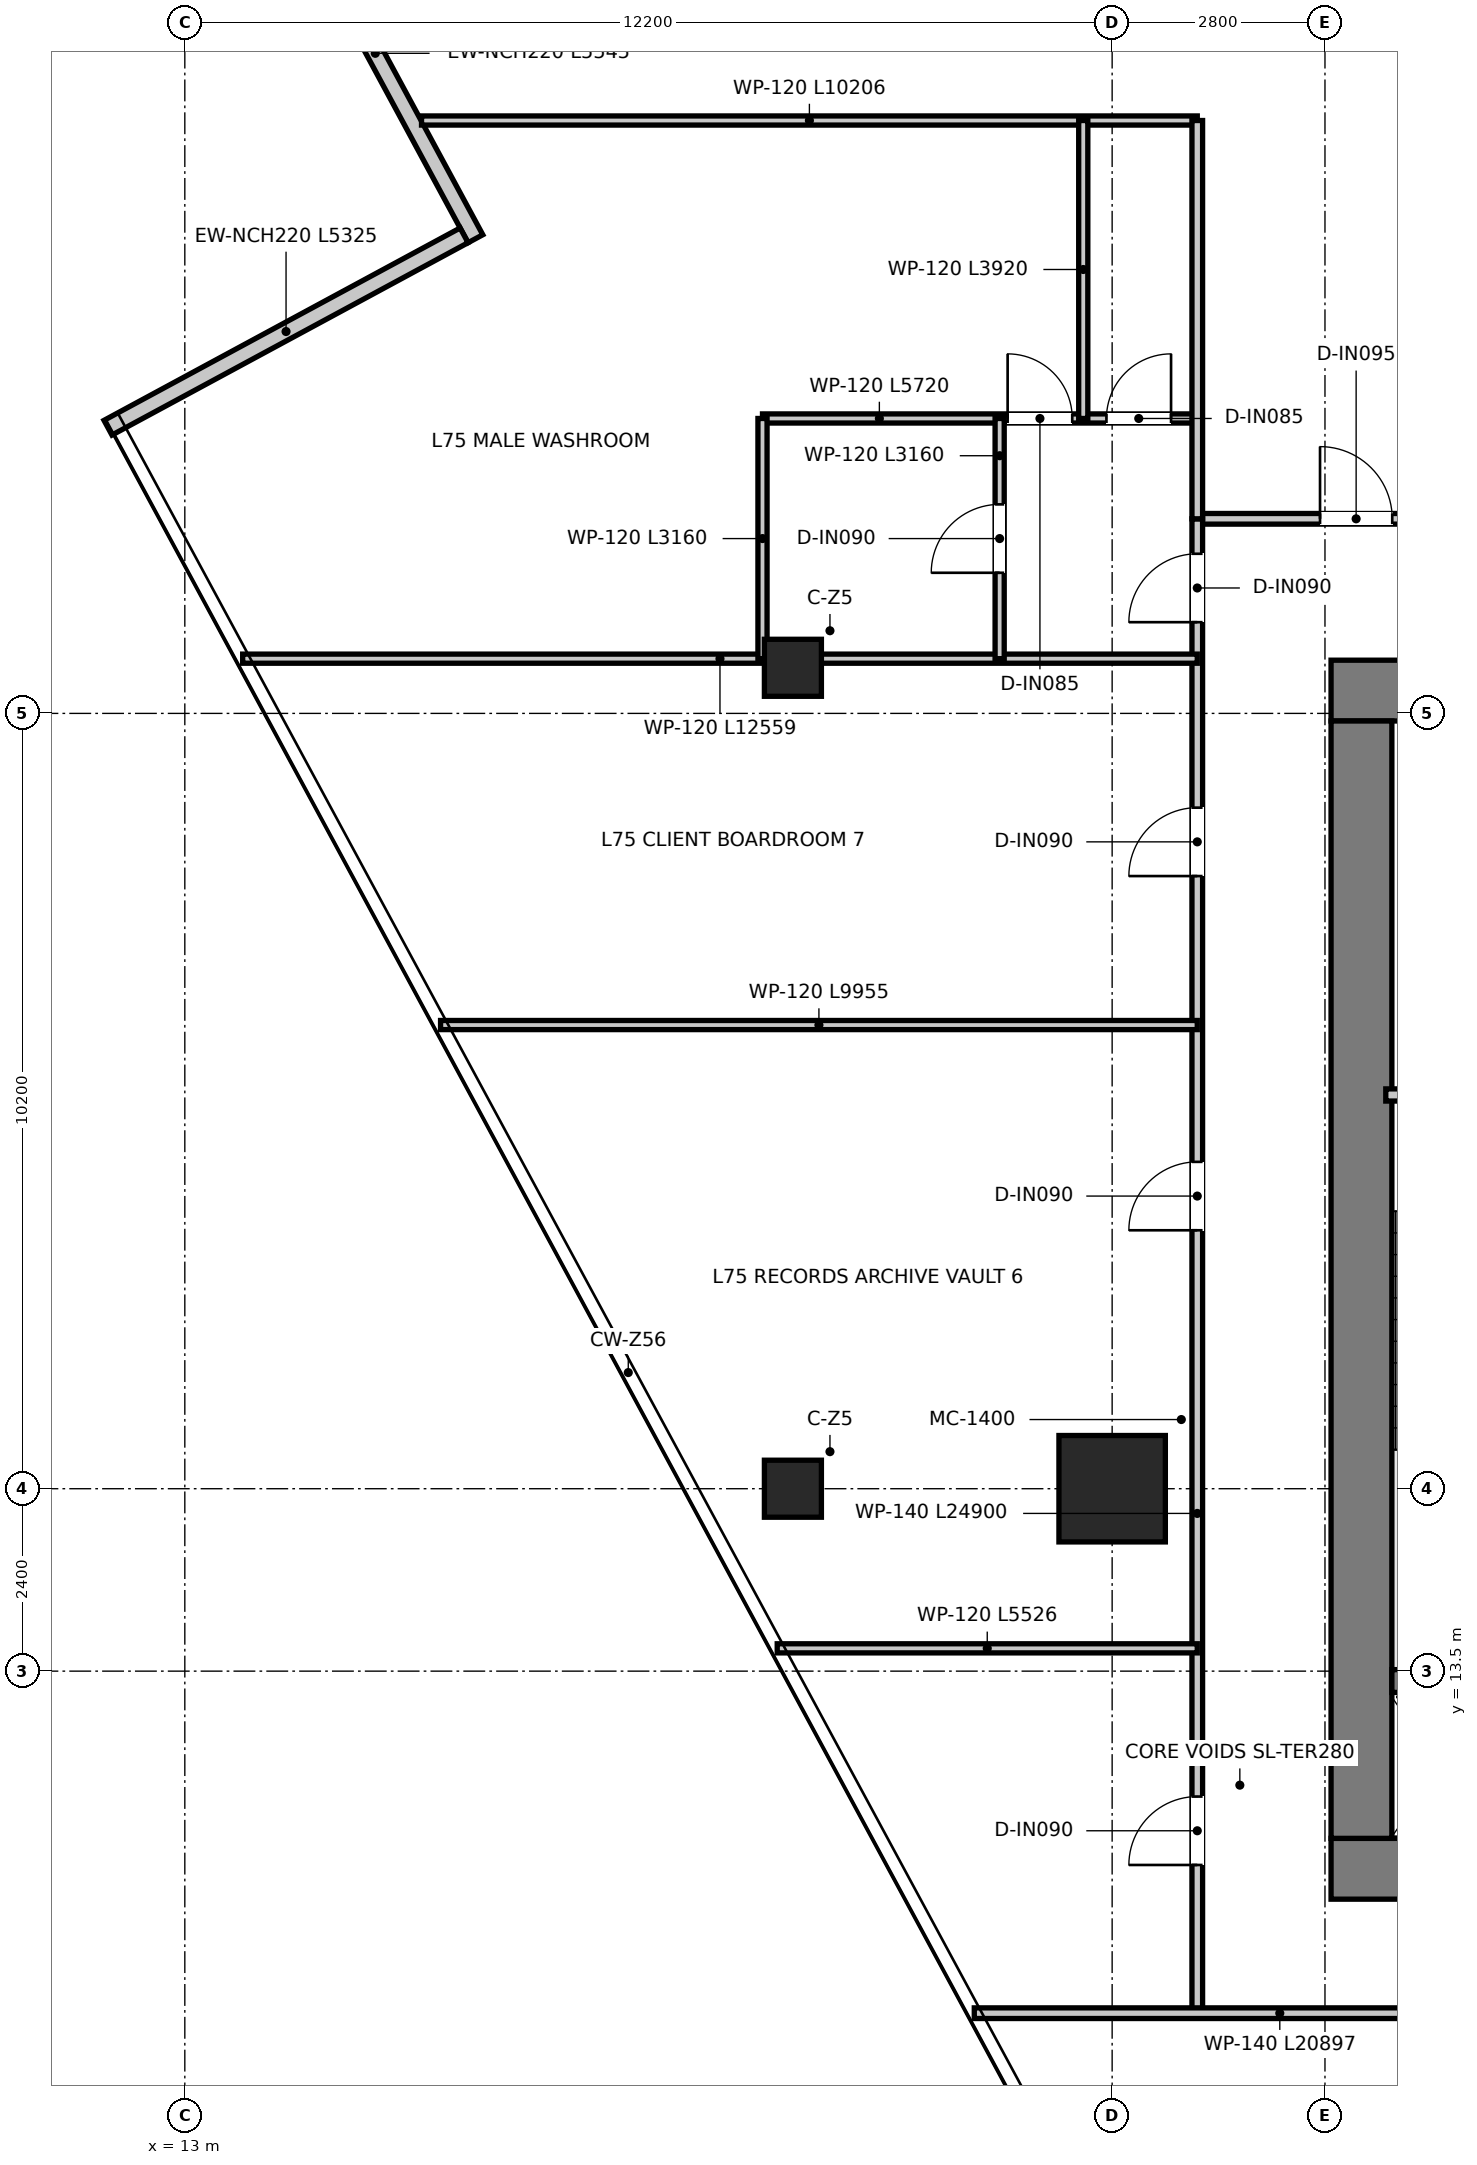
"""IFC4 building model, lengths in metres.
Left out: names, types, materials, properties, quantities, classifications, styles, units other than length and angle.
Written with IfcOpenShell. Run it as: python <this file> out.ifc"""

import sys

from ifc_helpers import new_model, si_unit, direction, frame, frame_2d, origin, origin_2d, place, context, subcontext, project, spatial, rectangle, extrude, source, transform, mapped, element, fill, save


model = new_model("IFC4")
c1 = context("Model", 3, precision=1e-05, world=origin(), true_north=direction((0.0, 1.0)))
c2 = subcontext(c1, "Body", "Model", "MODEL_VIEW")
j1 = project(units=[si_unit("LENGTHUNIT", "METRE"), si_unit("PLANEANGLEUNIT", "RADIAN")], contexts=[c1])
p1 = place(None, origin())
s1 = spatial("IfcSite", under=j1, at=p1, CompositionType="ELEMENT")
p2 = place(p1, origin())
s2 = spatial("IfcBuilding", under=s1, at=p2, CompositionType="ELEMENT")
p3 = place(p2, frame((0.0, 0.0, 306.9)))
s3 = spatial("IfcBuildingStorey", under=s2, at=p3, CompositionType="ELEMENT", Elevation=306.9)
p4 = place(p3, frame((28.08, 10.9, 0.0), z_axis=(0.0, 0.0, 1.0), x_axis=(1.0, 0.0, 0.0)))
e1 = element("IfcWall", 1, at=p4, inside=s3, PredefinedType="SHEAR", context=c2, shape_type="SweptSolid", body=[
    extrude(rectangle(XDim=15.84, YDim=0.8, at=frame_2d((7.92, 0.0))), origin(), (0.0, 0.0, 1.0), 3.95),
])
p5 = place(p3, frame((28.08, 26.4, 0.0), z_axis=(0.0, 0.0, 1.0), x_axis=(1.0, 0.0, 0.0)))
e2 = element("IfcWall", 2, at=p5, inside=s3, PredefinedType="SHEAR", context=c2, shape_type="SweptSolid", body=[
    extrude(rectangle(XDim=15.84, YDim=0.8, at=frame_2d((7.92, 0.0))), origin(), (0.0, 0.0, 1.0), 3.95),
])
p6 = place(p5, frame((7.22, 0.0, 0.0)))
e3 = element("IfcOpeningElement", 3, at=p6, cuts=e2, PredefinedType="OPENING", context=c2, shape_type="SweptSolid", body=[
    extrude(rectangle(XDim=1.4, YDim=2.2, at=frame_2d((0.7, 1.1))), frame((0.0, 0.41, 0.0), z_axis=(0.0, -1.0, 0.0), x_axis=(1.0, 0.0, 0.0)), (0.0, 0.0, 1.0), 0.82),
])
p7 = place(p5, frame((1.775, 0.0, 0.0)))
e4 = element("IfcOpeningElement", 4, at=p7, cuts=e2, PredefinedType="OPENING", context=c2, shape_type="SweptSolid", body=[
    extrude(rectangle(XDim=1.05, YDim=2.1, at=frame_2d((0.525, 1.05))), frame((0.0, 0.41, 0.0), z_axis=(0.0, -1.0, 0.0), x_axis=(1.0, 0.0, 0.0)), (0.0, 0.0, 1.0), 0.82),
])
p8 = place(p5, frame((13.015, 0.0, 0.0)))
e5 = element("IfcOpeningElement", 5, at=p8, cuts=e2, PredefinedType="OPENING", context=c2, shape_type="SweptSolid", body=[
    extrude(rectangle(XDim=1.05, YDim=2.1, at=frame_2d((0.525, 1.05))), frame((0.0, 0.41, 0.0), z_axis=(0.0, -1.0, 0.0), x_axis=(1.0, 0.0, 0.0)), (0.0, 0.0, 1.0), 0.82),
])
p9 = place(p3, frame((28.48, 11.3, 0.0), z_axis=(0.0, 0.0, 1.0), x_axis=(0.0, 1.0, 0.0)))
e6 = element("IfcWall", 6, at=p9, inside=s3, PredefinedType="SHEAR", context=c2, shape_type="SweptSolid", body=[
    extrude(rectangle(XDim=14.7, YDim=0.8, at=frame_2d((7.35, 0.0))), origin(), (0.0, 0.0, 1.0), 3.95),
])
p10 = place(p3, frame((28.88, 13.37, 0.0), z_axis=(0.0, 0.0, 1.0), x_axis=(1.0, 0.0, 0.0)))
e7 = element("IfcWall", 7, at=p10, inside=s3, PredefinedType="SHEAR", context=c2, shape_type="SweptSolid", body=[
    extrude(rectangle(XDim=3.1, YDim=0.3, at=frame_2d((1.55, 0.0))), origin(), (0.0, 0.0, 1.0), 3.95),
])
m1 = source(origin(), c2, "Body", "SweptSolid", [
    extrude(rectangle(XDim=1.4, YDim=1.4, at=origin_2d()), origin(), (0.0, 0.0, 1.0), 3.95),
])
p11 = place(p3, frame((25.2, 15.9, 0.0), z_axis=(0.0, 0.0, 1.0), x_axis=(1.0, 0.0, 0.0)))
e8 = element("IfcColumn", 8, at=p11, inside=s3, PredefinedType="USERDEFINED", context=c2, shape_type="MappedRepresentation", body=[
    mapped(m1, transform((0.0, 0.0, 0.0), x_axis=(1.0, 0.0, 0.0), y_axis=(0.0, 1.0, 0.0), z_axis=(0.0, 0.0, 1.0), scale=1.0)),
])
m2 = source(origin(), c2, "Body", "SweptSolid", [
    extrude(rectangle(XDim=0.75, YDim=0.75, at=origin_2d()), origin(), (0.0, 0.0, 1.0), 3.95),
])
for number, where, z_axis, x_axis in (
    (9, (21.0, 15.9, 0.0), (0.0, 0.0, 1.0), (1.0, 0.0, 0.0)),
    (10, (21.0, 26.7, 0.0), (0.0, 0.0, 1.0), (1.0, 0.0, 0.0)),
):
    element("IfcColumn", number, at=place(p3, frame(where, z_axis=z_axis, x_axis=x_axis)), inside=s3, PredefinedType="COLUMN", context=c2, shape_type="MappedRepresentation", body=[
        mapped(m2, transform((0.0, 0.0, 0.0), x_axis=(1.0, 0.0, 0.0), y_axis=(0.0, 1.0, 0.0), z_axis=(0.0, 0.0, 1.0), scale=1.0)),
    ])
p12 = place(p3, frame((14.188, 37.223, 0.0), z_axis=(0.0, 0.0, 1.0), x_axis=(0.475257315172, -0.879846852796, 0.0)))
e11 = element("IfcWall", 11, at=p12, inside=s3, PredefinedType="ELEMENTEDWALL", context=c2, shape_type="SweptSolid", body=[
    extrude(rectangle(XDim=5.545, YDim=0.22, at=frame_2d((2.772, 0.0))), origin(), (0.0, 0.0, 1.0), 3.67),
])
p13 = place(p3, frame((16.674, 32.389, 0.0), z_axis=(0.0, 0.0, 1.0), x_axis=(-0.879859387449, -0.475234108958, 0.0)))
e12 = element("IfcWall", 12, at=p13, inside=s3, PredefinedType="ELEMENTEDWALL", context=c2, shape_type="SweptSolid", body=[
    extrude(rectangle(XDim=5.325, YDim=0.22, at=frame_2d((2.662, 0.0))), origin(), (0.0, 0.0, 1.0), 3.67),
])
p14 = place(p3, frame((28.8, 21.08, 0.0), z_axis=(0.0, 0.0, 1.0), x_axis=(1.0, 0.0, 0.0)))
e13 = element("IfcWall", 13, at=p14, inside=s3, PredefinedType="PARTITIONING", context=c2, shape_type="SweptSolid", body=[
    extrude(rectangle(XDim=3.16, YDim=0.16, at=frame_2d((1.58, 0.0))), origin(), (0.0, 0.0, 1.0), 3.67),
])
p15 = place(p14, frame((1.055, 0.0, 0.0)))
e14 = element("IfcOpeningElement", 14, at=p15, cuts=e13, PredefinedType="OPENING", context=c2, shape_type="SweptSolid", body=[
    extrude(rectangle(XDim=1.05, YDim=2.1, at=frame_2d((0.525, 1.05))), frame((0.0, 0.09, 0.0), z_axis=(0.0, -1.0, 0.0), x_axis=(1.0, 0.0, 0.0)), (0.0, 0.0, 1.0), 0.18),
])
p16 = place(p3, frame((26.32, 28.66, 0.0), z_axis=(0.0, 0.0, 1.0), x_axis=(1.0, 0.0, 0.0)))
e15 = element("IfcWall", 15, at=p16, inside=s3, PredefinedType="PARTITIONING", context=c2, shape_type="SweptSolid", body=[
    extrude(rectangle(XDim=19.36, YDim=0.14, at=frame_2d((9.68, 0.0))), origin(), (0.0, 0.0, 1.0), 3.18),
])
p17 = place(p16, frame((1.615, 0.0, 0.0)))
e16 = element("IfcOpeningElement", 16, at=p17, cuts=e15, PredefinedType="OPENING", context=c2, shape_type="SweptSolid", body=[
    extrude(rectangle(XDim=0.95, YDim=2.1, at=frame_2d((0.475, 1.05))), frame((0.0, 0.08, 0.0), z_axis=(0.0, -1.0, 0.0), x_axis=(1.0, 0.0, 0.0)), (0.0, 0.0, 1.0), 0.16),
])
p18 = place(p16, frame((6.455, 0.0, 0.0)))
e17 = element("IfcOpeningElement", 17, at=p18, cuts=e15, PredefinedType="OPENING", context=c2, shape_type="SweptSolid", body=[
    extrude(rectangle(XDim=0.95, YDim=2.1, at=frame_2d((0.475, 1.05))), frame((0.0, 0.08, 0.0), z_axis=(0.0, -1.0, 0.0), x_axis=(1.0, 0.0, 0.0)), (0.0, 0.0, 1.0), 0.16),
])
p19 = place(p16, frame((11.955, 0.0, 0.0)))
e18 = element("IfcOpeningElement", 18, at=p19, cuts=e15, PredefinedType="OPENING", context=c2, shape_type="SweptSolid", body=[
    extrude(rectangle(XDim=0.95, YDim=2.1, at=frame_2d((0.475, 1.05))), frame((0.0, 0.08, 0.0), z_axis=(0.0, -1.0, 0.0), x_axis=(1.0, 0.0, 0.0)), (0.0, 0.0, 1.0), 0.16),
])
p20 = place(p16, frame((16.795, 0.0, 0.0)))
e19 = element("IfcOpeningElement", 19, at=p20, cuts=e15, PredefinedType="OPENING", context=c2, shape_type="SweptSolid", body=[
    extrude(rectangle(XDim=0.95, YDim=2.1, at=frame_2d((0.475, 1.05))), frame((0.0, 0.08, 0.0), z_axis=(0.0, -1.0, 0.0), x_axis=(1.0, 0.0, 0.0)), (0.0, 0.0, 1.0), 0.16),
])
p21 = place(p3, frame((26.32, 9.0, 0.0), z_axis=(0.0, 0.0, 1.0), x_axis=(0.0, 1.0, 0.0)))
e20 = element("IfcWall", 20, at=p21, inside=s3, PredefinedType="PARTITIONING", context=c2, shape_type="SweptSolid", body=[
    extrude(rectangle(XDim=19.66, YDim=0.14, at=frame_2d((9.83, 0.0))), origin(), (0.0, 0.0, 1.0), 3.13),
])
p22 = place(p21, frame((18.3, 0.0, 0.0)))
e21 = element("IfcOpeningElement", 21, at=p22, cuts=e20, PredefinedType="OPENING", context=c2, shape_type="SweptSolid", body=[
    extrude(rectangle(XDim=0.9, YDim=2.1, at=frame_2d((0.45, 1.05))), frame((0.0, 0.08, 0.0), z_axis=(0.0, -1.0, 0.0), x_axis=(1.0, 0.0, 0.0)), (0.0, 0.0, 1.0), 0.16),
])
p23 = place(p21, frame((1.95, 0.0, 0.0)))
e22 = element("IfcOpeningElement", 22, at=p23, cuts=e20, PredefinedType="OPENING", context=c2, shape_type="SweptSolid", body=[
    extrude(rectangle(XDim=0.9, YDim=2.1, at=frame_2d((0.45, 1.05))), frame((0.0, 0.08, 0.0), z_axis=(0.0, -1.0, 0.0), x_axis=(1.0, 0.0, 0.0)), (0.0, 0.0, 1.0), 0.16),
])
p24 = place(p21, frame((10.3, 0.0, 0.0)))
e23 = element("IfcOpeningElement", 23, at=p24, cuts=e20, PredefinedType="OPENING", context=c2, shape_type="SweptSolid", body=[
    extrude(rectangle(XDim=0.9, YDim=2.1, at=frame_2d((0.45, 1.05))), frame((0.0, 0.08, 0.0), z_axis=(0.0, -1.0, 0.0), x_axis=(1.0, 0.0, 0.0)), (0.0, 0.0, 1.0), 0.16),
])
p25 = place(p21, frame((14.96, 0.0, 0.0)))
e24 = element("IfcOpeningElement", 24, at=p25, cuts=e20, PredefinedType="OPENING", context=c2, shape_type="SweptSolid", body=[
    extrude(rectangle(XDim=0.9, YDim=2.1, at=frame_2d((0.45, 1.05))), frame((0.0, 0.08, 0.0), z_axis=(0.0, -1.0, 0.0), x_axis=(1.0, 0.0, 0.0)), (0.0, 0.0, 1.0), 0.16),
])
p26 = place(p3, frame((23.386, 9.0, 0.0), z_axis=(0.0, 0.0, 1.0), x_axis=(1.0, 0.0, 0.0)))
e25 = element("IfcWall", 25, at=p26, inside=s3, PredefinedType="PARTITIONING", context=c2, shape_type="SweptSolid", body=[
    extrude(rectangle(XDim=20.897, YDim=0.14, at=frame_2d((10.448, 0.0))), origin(), (0.0, 0.0, 1.0), 3.67),
])
p27 = place(p26, frame((8.189, 0.0, 0.0)))
e26 = element("IfcOpeningElement", 26, at=p27, cuts=e25, PredefinedType="OPENING", context=c2, shape_type="SweptSolid", body=[
    extrude(rectangle(XDim=0.85, YDim=2.1, at=frame_2d((0.425, 1.05))), frame((0.0, 0.08, 0.0), z_axis=(0.0, -1.0, 0.0), x_axis=(1.0, 0.0, 0.0)), (0.0, 0.0, 1.0), 0.16),
])
p28 = place(p26, frame((16.189, 0.0, 0.0)))
e27 = element("IfcOpeningElement", 27, at=p28, cuts=e25, PredefinedType="OPENING", context=c2, shape_type="SweptSolid", body=[
    extrude(rectangle(XDim=0.85, YDim=2.1, at=frame_2d((0.425, 1.05))), frame((0.0, 0.08, 0.0), z_axis=(0.0, -1.0, 0.0), x_axis=(1.0, 0.0, 0.0)), (0.0, 0.0, 1.0), 0.16),
])
p29 = place(p3, frame((13.761, 26.82, 0.0), z_axis=(0.0, 0.0, 1.0), x_axis=(1.0, 0.0, 0.0)))
e28 = element("IfcWall", 28, at=p29, inside=s3, PredefinedType="PARTITIONING", context=c2, shape_type="SweptSolid", body=[
    extrude(rectangle(XDim=12.559, YDim=0.12, at=frame_2d((6.28, 0.0))), origin(), (0.0, 0.0, 1.0), 3.13),
])
p30 = place(p3, frame((16.114, 33.9, 0.0), z_axis=(0.0, 0.0, 1.0), x_axis=(1.0, 0.0, 0.0)))
e29 = element("IfcWall", 29, at=p30, inside=s3, PredefinedType="PARTITIONING", context=c2, shape_type="SweptSolid", body=[
    extrude(rectangle(XDim=10.206, YDim=0.12, at=frame_2d((5.103, 0.0))), origin(), (0.0, 0.0, 1.0), 3.13),
])
p31 = place(p3, frame((20.6, 29.98, 0.0), z_axis=(0.0, 0.0, 1.0), x_axis=(1.0, 0.0, 0.0)))
e30 = element("IfcWall", 30, at=p31, inside=s3, PredefinedType="PARTITIONING", context=c2, shape_type="SweptSolid", body=[
    extrude(rectangle(XDim=5.72, YDim=0.12, at=frame_2d((2.86, 0.0))), origin(), (0.0, 0.0, 1.0), 3.13),
])
p32 = place(p31, frame((3.225, 0.0, 0.0)))
e31 = element("IfcOpeningElement", 31, at=p32, cuts=e30, PredefinedType="OPENING", context=c2, shape_type="SweptSolid", body=[
    extrude(rectangle(XDim=0.85, YDim=2.1, at=frame_2d((0.425, 1.05))), frame((0.0, 0.07, 0.0), z_axis=(0.0, -1.0, 0.0), x_axis=(1.0, 0.0, 0.0)), (0.0, 0.0, 1.0), 0.14),
])
p33 = place(p31, frame((4.525, 0.0, 0.0)))
e32 = element("IfcOpeningElement", 32, at=p33, cuts=e30, PredefinedType="OPENING", context=c2, shape_type="SweptSolid", body=[
    extrude(rectangle(XDim=0.85, YDim=2.1, at=frame_2d((0.425, 1.05))), frame((0.0, 0.07, 0.0), z_axis=(0.0, -1.0, 0.0), x_axis=(1.0, 0.0, 0.0)), (0.0, 0.0, 1.0), 0.14),
])
p34 = place(p3, frame((20.6, 26.82, 0.0), z_axis=(0.0, 0.0, 1.0), x_axis=(0.0, 1.0, 0.0)))
e33 = element("IfcWall", 33, at=p34, inside=s3, PredefinedType="PARTITIONING", context=c2, shape_type="SweptSolid", body=[
    extrude(rectangle(XDim=3.16, YDim=0.12, at=frame_2d((1.58, 0.0))), origin(), (0.0, 0.0, 1.0), 3.67),
])
p35 = place(p3, frame((23.72, 26.82, 0.0), z_axis=(0.0, 0.0, 1.0), x_axis=(0.0, 1.0, 0.0)))
e34 = element("IfcWall", 34, at=p35, inside=s3, PredefinedType="PARTITIONING", context=c2, shape_type="SweptSolid", body=[
    extrude(rectangle(XDim=3.16, YDim=0.12, at=frame_2d((1.58, 0.0))), origin(), (0.0, 0.0, 1.0), 3.18),
])
p36 = place(p35, frame((1.13, 0.0, 0.0)))
e35 = element("IfcOpeningElement", 35, at=p36, cuts=e34, PredefinedType="OPENING", context=c2, shape_type="SweptSolid", body=[
    extrude(rectangle(XDim=0.9, YDim=2.1, at=frame_2d((0.45, 1.05))), frame((0.0, 0.07, 0.0), z_axis=(0.0, -1.0, 0.0), x_axis=(1.0, 0.0, 0.0)), (0.0, 0.0, 1.0), 0.14),
])
p37 = place(p3, frame((24.82, 29.98, 0.0), z_axis=(0.0, 0.0, 1.0), x_axis=(0.0, 1.0, 0.0)))
e36 = element("IfcWall", 36, at=p37, inside=s3, PredefinedType="PARTITIONING", context=c2, shape_type="SweptSolid", body=[
    extrude(rectangle(XDim=3.92, YDim=0.12, at=frame_2d((1.96, 0.0))), origin(), (0.0, 0.0, 1.0), 3.31),
])
p38 = place(p3, frame((26.32, 28.66, 0.0), z_axis=(0.0, 0.0, 1.0), x_axis=(0.0, 1.0, 0.0)))
e37 = element("IfcWall", 37, at=p38, inside=s3, PredefinedType="PARTITIONING", context=c2, shape_type="SweptSolid", body=[
    extrude(rectangle(XDim=5.24, YDim=0.14, at=frame_2d((2.62, 0.0))), origin(), (0.0, 0.0, 1.0), 3.43),
])
p39 = place(p3, frame((20.794, 13.8, 0.0), z_axis=(0.0, 0.0, 1.0), x_axis=(1.0, 0.0, 0.0)))
e38 = element("IfcWall", 38, at=p39, inside=s3, PredefinedType="PARTITIONING", context=c2, shape_type="SweptSolid", body=[
    extrude(rectangle(XDim=5.526, YDim=0.12, at=frame_2d((2.763, 0.0))), origin(), (0.0, 0.0, 1.0), 3.18),
])
p40 = place(p3, frame((16.365, 22.0, 0.0), z_axis=(0.0, 0.0, 1.0), x_axis=(1.0, 0.0, 0.0)))
e39 = element("IfcWall", 39, at=p40, inside=s3, PredefinedType="PARTITIONING", context=c2, shape_type="SweptSolid", body=[
    extrude(rectangle(XDim=9.956, YDim=0.12, at=frame_2d((4.978, 0.0))), origin(), (0.0, 0.0, 1.0), 3.13),
])
p41 = place(p22, origin())
e40 = element("IfcDoor", 40, at=p41, inside=s3, OperationType="SINGLE_SWING_LEFT", PredefinedType="DOOR", context=c2, shape_type="SweptSolid", body=[
    extrude(rectangle(XDim=0.9, YDim=2.1, at=frame_2d((0.45, 1.05))), frame((0.0, 0.025, 0.0), z_axis=(0.0, -1.0, 0.0), x_axis=(1.0, 0.0, 0.0)), (0.0, 0.0, 1.0), 0.05),
])
fill(e21, e40)
p42 = place(p32, origin())
e41 = element("IfcDoor", 41, at=p42, inside=s3, OperationType="SINGLE_SWING_LEFT", PredefinedType="DOOR", context=c2, shape_type="SweptSolid", body=[
    extrude(rectangle(XDim=0.85, YDim=2.1, at=frame_2d((0.425, 1.05))), frame((0.0, 0.025, 0.0), z_axis=(0.0, -1.0, 0.0), x_axis=(1.0, 0.0, 0.0)), (0.0, 0.0, 1.0), 0.05),
])
fill(e31, e41)
p43 = place(p33, origin())
e42 = element("IfcDoor", 42, at=p43, inside=s3, OperationType="SINGLE_SWING_RIGHT", PredefinedType="DOOR", context=c2, shape_type="SweptSolid", body=[
    extrude(rectangle(XDim=0.85, YDim=2.1, at=frame_2d((0.425, 1.05))), frame((0.0, 0.025, 0.0), z_axis=(0.0, -1.0, 0.0), x_axis=(1.0, 0.0, 0.0)), (0.0, 0.0, 1.0), 0.05),
])
fill(e32, e42)
p44 = place(p36, origin())
e43 = element("IfcDoor", 43, at=p44, inside=s3, OperationType="SINGLE_SWING_LEFT", PredefinedType="DOOR", context=c2, shape_type="SweptSolid", body=[
    extrude(rectangle(XDim=0.9, YDim=2.1, at=frame_2d((0.45, 1.05))), frame((0.0, 0.025, 0.0), z_axis=(0.0, -1.0, 0.0), x_axis=(1.0, 0.0, 0.0)), (0.0, 0.0, 1.0), 0.05),
])
fill(e35, e43)
p45 = place(p17, origin())
e44 = element("IfcDoor", 44, at=p45, inside=s3, OperationType="SINGLE_SWING_LEFT", PredefinedType="DOOR", context=c2, shape_type="SweptSolid", body=[
    extrude(rectangle(XDim=0.95, YDim=2.1, at=frame_2d((0.475, 1.05))), frame((0.0, 0.025, 0.0), z_axis=(0.0, -1.0, 0.0), x_axis=(1.0, 0.0, 0.0)), (0.0, 0.0, 1.0), 0.05),
])
fill(e16, e44)
p46 = place(p23, origin())
e45 = element("IfcDoor", 45, at=p46, inside=s3, OperationType="SINGLE_SWING_LEFT", PredefinedType="DOOR", context=c2, shape_type="SweptSolid", body=[
    extrude(rectangle(XDim=0.9, YDim=2.1, at=frame_2d((0.45, 1.05))), frame((0.0, 0.025, 0.0), z_axis=(0.0, -1.0, 0.0), x_axis=(1.0, 0.0, 0.0)), (0.0, 0.0, 1.0), 0.05),
])
fill(e22, e45)
p47 = place(p24, origin())
e46 = element("IfcDoor", 46, at=p47, inside=s3, OperationType="SINGLE_SWING_LEFT", PredefinedType="DOOR", context=c2, shape_type="SweptSolid", body=[
    extrude(rectangle(XDim=0.9, YDim=2.1, at=frame_2d((0.45, 1.05))), frame((0.0, 0.025, 0.0), z_axis=(0.0, -1.0, 0.0), x_axis=(1.0, 0.0, 0.0)), (0.0, 0.0, 1.0), 0.05),
])
fill(e23, e46)
p48 = place(p25, origin())
e47 = element("IfcDoor", 47, at=p48, inside=s3, OperationType="SINGLE_SWING_LEFT", PredefinedType="DOOR", context=c2, shape_type="SweptSolid", body=[
    extrude(rectangle(XDim=0.9, YDim=2.1, at=frame_2d((0.45, 1.05))), frame((0.0, 0.025, 0.0), z_axis=(0.0, -1.0, 0.0), x_axis=(1.0, 0.0, 0.0)), (0.0, 0.0, 1.0), 0.05),
])
fill(e24, e47)
save(model, sys.argv[1])
